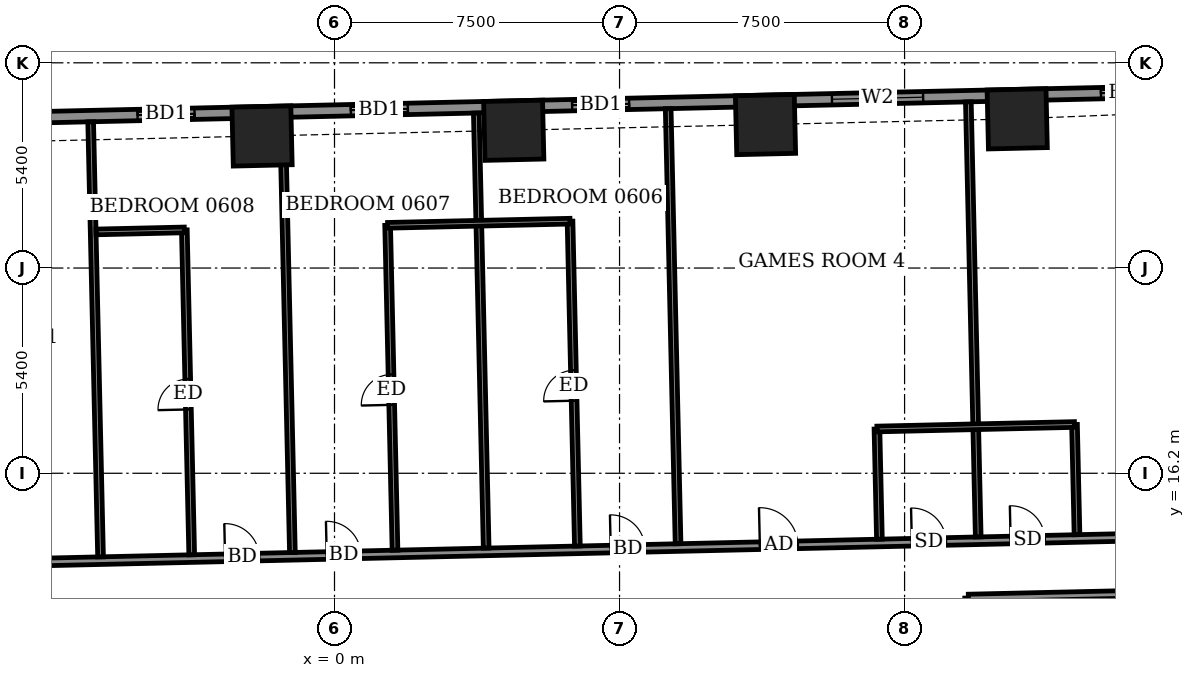
"""IFC4 building model, lengths in metres.
Left out: names, types, materials, properties, quantities, classifications, styles, units other than length and angle.
Written with IfcOpenShell. Run it as: python <this file> out.ifc"""

import sys

from ifc_helpers import new_model, si_unit, direction, frame, frame_2d, origin, origin_2d, place, context, subcontext, project, spatial, rectangle, extrude, element, fill, save


model = new_model("IFC4")
c1 = context("Model", 3, precision=1e-05, world=origin(), true_north=direction((0.0, 1.0)))
c2 = subcontext(c1, "Body", "Model", "MODEL_VIEW")
j1 = project(units=[si_unit("LENGTHUNIT", "METRE"), si_unit("PLANEANGLEUNIT", "RADIAN")], contexts=[c1])
p1 = place(None, origin())
s1 = spatial("IfcSite", under=j1, at=p1, CompositionType="ELEMENT")
p2 = place(p1, origin())
s2 = spatial("IfcBuilding", under=s1, at=p2, CompositionType="ELEMENT")
p3 = place(p2, frame((0.0, 0.0, 29.5)))
s3 = spatial("IfcBuildingStorey", under=s2, at=p3, CompositionType="ELEMENT", Elevation=29.5)
for number, where, z_axis, x_axis in (
    (1, (17.964, 25.526, -0.55), (0.0, 0.0, 1.0), (-1.0, -0.023, 0.0)),
    (2, (11.341, 25.375, -0.55), (0.0, 0.0, 1.0), (-1.0, -0.023, 0.0)),
    (3, (4.717, 25.225, -0.55), (0.0, 0.0, 1.0), (-1.0, -0.023, 0.0)),
    (4, (-1.906, 25.075, -0.55), (0.0, 0.0, 1.0), (-1.0, -0.023, 0.0)),
):
    element("IfcColumn", number, at=place(p3, frame(where, z_axis=z_axis, x_axis=x_axis)), inside=s3, PredefinedType="COLUMN", context=c2, shape_type="SweptSolid", body=[
        extrude(rectangle(XDim=1.55, YDim=1.55, at=origin_2d()), origin(), (0.0, 0.0, 1.0), 4.6),
    ])
p4 = place(p3, frame((24.423, 26.298, 0.0), z_axis=(0.0, 0.0, 1.0), x_axis=(-0.999742433108, -0.022695097355, 0.0)))
e5 = element("IfcWall", 5, at=p4, inside=s3, PredefinedType="SOLIDWALL", context=c2, shape_type="SweptSolid", body=[
    extrude(rectangle(XDim=52.701, YDim=0.3, at=frame_2d((26.35, 0.0))), origin(), (0.0, 0.0, 1.0), 4.05),
])
p5 = place(p4, frame((2.757, 0.0, 0.0)))
e6 = element("IfcOpeningElement", 6, at=p5, cuts=e5, PredefinedType="OPENING", context=c2, shape_type="SweptSolid", body=[
    extrude(rectangle(XDim=1.5, YDim=2.4, at=frame_2d((0.75, 1.2))), frame((0.0, 0.16, 0.0), z_axis=(0.0, -1.0, 0.0), x_axis=(1.0, 0.0, 0.0)), (0.0, 0.0, 1.0), 0.32),
])
p6 = place(p4, frame((8.937, 0.0, 0.9)))
e7 = element("IfcOpeningElement", 7, at=p6, cuts=e5, PredefinedType="OPENING", context=c2, shape_type="SweptSolid", body=[
    extrude(rectangle(XDim=2.4, YDim=1.5, at=frame_2d((1.2, 0.75))), frame((0.0, 0.16, 0.0), z_axis=(0.0, -1.0, 0.0), x_axis=(1.0, 0.0, 0.0)), (0.0, 0.0, 1.0), 0.32),
])
p7 = place(p4, frame((16.675, 0.0, 0.0)))
e8 = element("IfcOpeningElement", 8, at=p7, cuts=e5, PredefinedType="OPENING", context=c2, shape_type="SweptSolid", body=[
    extrude(rectangle(XDim=1.5, YDim=2.4, at=frame_2d((0.75, 1.2))), frame((0.0, 0.16, 0.0), z_axis=(0.0, -1.0, 0.0), x_axis=(1.0, 0.0, 0.0)), (0.0, 0.0, 1.0), 0.32),
])
p8 = place(p4, frame((22.5, 0.0, 0.0)))
e9 = element("IfcOpeningElement", 9, at=p8, cuts=e5, PredefinedType="OPENING", context=c2, shape_type="SweptSolid", body=[
    extrude(rectangle(XDim=1.5, YDim=2.4, at=frame_2d((0.75, 1.2))), frame((0.0, 0.16, 0.0), z_axis=(0.0, -1.0, 0.0), x_axis=(1.0, 0.0, 0.0)), (0.0, 0.0, 1.0), 0.32),
])
p9 = place(p4, frame((28.113, 0.0, 0.0)))
e10 = element("IfcOpeningElement", 10, at=p9, cuts=e5, PredefinedType="OPENING", context=c2, shape_type="SweptSolid", body=[
    extrude(rectangle(XDim=1.5, YDim=2.4, at=frame_2d((0.75, 1.2))), frame((0.0, 0.16, 0.0), z_axis=(0.0, -1.0, 0.0), x_axis=(1.0, 0.0, 0.0)), (0.0, 0.0, 1.0), 0.32),
])
p10 = place(p4, frame((34.1, 0.0, 0.9)))
e11 = element("IfcOpeningElement", 11, at=p10, cuts=e5, PredefinedType="OPENING", context=c2, shape_type="SweptSolid", body=[
    extrude(rectangle(XDim=2.4, YDim=1.5, at=frame_2d((1.2, 0.75))), frame((0.0, 0.16, 0.0), z_axis=(0.0, -1.0, 0.0), x_axis=(1.0, 0.0, 0.0)), (0.0, 0.0, 1.0), 0.32),
])
p11 = place(p4, frame((41.363, 0.0, 0.9)))
e12 = element("IfcOpeningElement", 12, at=p11, cuts=e5, PredefinedType="OPENING", context=c2, shape_type="SweptSolid", body=[
    extrude(rectangle(XDim=2.4, YDim=1.5, at=frame_2d((1.2, 0.75))), frame((0.0, 0.16, 0.0), z_axis=(0.0, -1.0, 0.0), x_axis=(1.0, 0.0, 0.0)), (0.0, 0.0, 1.0), 0.32),
])
p12 = place(p4, frame((47.965, 0.0, 0.9)))
e13 = element("IfcOpeningElement", 13, at=p12, cuts=e5, PredefinedType="OPENING", context=c2, shape_type="SweptSolid", body=[
    extrude(rectangle(XDim=2.4, YDim=1.5, at=frame_2d((1.2, 0.75))), frame((0.0, 0.16, 0.0), z_axis=(0.0, -1.0, 0.0), x_axis=(1.0, 0.0, 0.0)), (0.0, 0.0, 1.0), 0.32),
])
p13 = place(p3, frame((2.746, 27.256, 0.0), z_axis=(0.0, 0.0, 1.0), x_axis=(0.999743073592, 0.022666865795, 0.0)))
e14 = element("IfcWall", 14, at=p13, inside=s3, PredefinedType="USERDEFINED", context=c2, shape_type="SweptSolid", body=[
    extrude(rectangle(XDim=5.999, YDim=0.55, at=frame_2d((3.0, 0.0))), origin(), (0.0, 0.0, 1.0), 0.8),
])
p14 = place(p3, frame((16.803, 7.675, 0.0), z_axis=(0.0, 0.0, 1.0), x_axis=(-0.022667483124, 0.999743059595, 0.0)))
e15 = element("IfcWall", 15, at=p14, inside=s3, PredefinedType="PARTITIONING", context=c2, shape_type="SweptSolid", body=[
    extrude(rectangle(XDim=5.245, YDim=0.2, at=frame_2d((2.623, 0.0))), origin(), (0.0, 0.0, 1.0), 4.05),
])
p15 = place(p14, frame((1.075, 0.0, 0.0)))
e16 = element("IfcOpeningElement", 16, at=p15, cuts=e15, PredefinedType="OPENING", context=c2, shape_type="SweptSolid", body=[
    extrude(rectangle(XDim=0.9, YDim=2.1, at=frame_2d((0.45, 1.05))), frame((0.0, 0.11, 0.0), z_axis=(0.0, -1.0, 0.0), x_axis=(1.0, 0.0, 0.0)), (0.0, 0.0, 1.0), 0.22),
])
p16 = place(p3, frame((16.679, 12.918, 0.0), z_axis=(0.0, 0.0, 1.0), x_axis=(0.999742162372, 0.022707020428, 0.0)))
e17 = element("IfcWall", 17, at=p16, inside=s3, PredefinedType="PARTITIONING", context=c2, shape_type="SweptSolid", body=[
    extrude(rectangle(XDim=10.795, YDim=0.2, at=frame_2d((5.397, 0.0))), origin(), (0.0, 0.0, 1.0), 4.05),
])
p17 = place(p3, frame((-31.347, 13.329, 0.0), z_axis=(0.0, 0.0, 1.0), x_axis=(0.999742613079, 0.022687168058, 0.0)))
e18 = element("IfcWall", 18, at=p17, inside=s3, PredefinedType="PARTITIONING", context=c2, shape_type="SweptSolid", body=[
    extrude(rectangle(XDim=58.799, YDim=0.2, at=frame_2d((29.399, 0.0))), origin(), (0.0, 0.0, 1.0), 4.05),
])
p18 = place(p17, frame((55.05, 0.0, 0.0)))
e19 = element("IfcOpeningElement", 19, at=p18, cuts=e18, PredefinedType="OPENING", context=c2, shape_type="SweptSolid", body=[
    extrude(rectangle(XDim=1.0, YDim=2.1, at=frame_2d((0.5, 1.05))), frame((0.0, 0.11, 0.0), z_axis=(0.0, -1.0, 0.0), x_axis=(1.0, 0.0, 0.0)), (0.0, 0.0, 1.0), 0.22),
])
p19 = place(p17, frame((49.15, 0.0, 0.0)))
e20 = element("IfcOpeningElement", 20, at=p19, cuts=e18, PredefinedType="OPENING", context=c2, shape_type="SweptSolid", body=[
    extrude(rectangle(XDim=0.9, YDim=2.1, at=frame_2d((0.45, 1.05))), frame((0.0, 0.11, 0.0), z_axis=(0.0, -1.0, 0.0), x_axis=(1.0, 0.0, 0.0)), (0.0, 0.0, 1.0), 0.22),
])
p20 = place(p17, frame((42.55, 0.0, 0.0)))
e21 = element("IfcOpeningElement", 21, at=p20, cuts=e18, PredefinedType="OPENING", context=c2, shape_type="SweptSolid", body=[
    extrude(rectangle(XDim=1.0, YDim=2.1, at=frame_2d((0.5, 1.05))), frame((0.0, 0.11, 0.0), z_axis=(0.0, -1.0, 0.0), x_axis=(1.0, 0.0, 0.0)), (0.0, 0.0, 1.0), 0.22),
])
p21 = place(p17, frame((46.55, 0.0, 0.0)))
e22 = element("IfcOpeningElement", 22, at=p21, cuts=e18, PredefinedType="OPENING", context=c2, shape_type="SweptSolid", body=[
    extrude(rectangle(XDim=0.9, YDim=2.1, at=frame_2d((0.45, 1.05))), frame((0.0, 0.11, 0.0), z_axis=(0.0, -1.0, 0.0), x_axis=(1.0, 0.0, 0.0)), (0.0, 0.0, 1.0), 0.22),
])
p22 = place(p17, frame((38.625, 0.0, 0.0)))
e23 = element("IfcOpeningElement", 23, at=p22, cuts=e18, PredefinedType="OPENING", context=c2, shape_type="SweptSolid", body=[
    extrude(rectangle(XDim=0.9, YDim=2.1, at=frame_2d((0.45, 1.05))), frame((0.0, 0.11, 0.0), z_axis=(0.0, -1.0, 0.0), x_axis=(1.0, 0.0, 0.0)), (0.0, 0.0, 1.0), 0.22),
])
p23 = place(p17, frame((31.15, 0.0, 0.0)))
e24 = element("IfcOpeningElement", 24, at=p23, cuts=e18, PredefinedType="OPENING", context=c2, shape_type="SweptSolid", body=[
    extrude(rectangle(XDim=0.9, YDim=2.1, at=frame_2d((0.45, 1.05))), frame((0.0, 0.11, 0.0), z_axis=(0.0, -1.0, 0.0), x_axis=(1.0, 0.0, 0.0)), (0.0, 0.0, 1.0), 0.22),
])
p24 = place(p17, frame((28.475, 0.0, 0.0)))
e25 = element("IfcOpeningElement", 25, at=p24, cuts=e18, PredefinedType="OPENING", context=c2, shape_type="SweptSolid", body=[
    extrude(rectangle(XDim=0.9, YDim=2.1, at=frame_2d((0.45, 1.05))), frame((0.0, 0.11, 0.0), z_axis=(0.0, -1.0, 0.0), x_axis=(1.0, 0.0, 0.0)), (0.0, 0.0, 1.0), 0.22),
])
p25 = place(p17, frame((21.6, 0.0, 0.0)))
e26 = element("IfcOpeningElement", 26, at=p25, cuts=e18, PredefinedType="OPENING", context=c2, shape_type="SweptSolid", body=[
    extrude(rectangle(XDim=1.0, YDim=2.1, at=frame_2d((0.5, 1.05))), frame((0.0, 0.11, 0.0), z_axis=(0.0, -1.0, 0.0), x_axis=(1.0, 0.0, 0.0)), (0.0, 0.0, 1.0), 0.22),
])
p26 = place(p17, frame((15.85, 0.0, 0.0)))
e27 = element("IfcOpeningElement", 27, at=p26, cuts=e18, PredefinedType="OPENING", context=c2, shape_type="SweptSolid", body=[
    extrude(rectangle(XDim=1.0, YDim=2.1, at=frame_2d((0.5, 1.05))), frame((0.0, 0.11, 0.0), z_axis=(0.0, -1.0, 0.0), x_axis=(1.0, 0.0, 0.0)), (0.0, 0.0, 1.0), 0.22),
])
p27 = place(p17, frame((11.95, 0.0, 0.0)))
e28 = element("IfcOpeningElement", 28, at=p27, cuts=e18, PredefinedType="OPENING", context=c2, shape_type="SweptSolid", body=[
    extrude(rectangle(XDim=0.9, YDim=2.1, at=frame_2d((0.45, 1.05))), frame((0.0, 0.11, 0.0), z_axis=(0.0, -1.0, 0.0), x_axis=(1.0, 0.0, 0.0)), (0.0, 0.0, 1.0), 0.22),
])
p28 = place(p17, frame((3.15, 0.0, 0.0)))
e29 = element("IfcOpeningElement", 29, at=p28, cuts=e18, PredefinedType="OPENING", context=c2, shape_type="SweptSolid", body=[
    extrude(rectangle(XDim=1.0, YDim=2.1, at=frame_2d((0.5, 1.05))), frame((0.0, 0.11, 0.0), z_axis=(0.0, -1.0, 0.0), x_axis=(1.0, 0.0, 0.0)), (0.0, 0.0, 1.0), 0.22),
])
p29 = place(p17, frame((9.45, 0.0, 0.0)))
e30 = element("IfcOpeningElement", 30, at=p29, cuts=e18, PredefinedType="OPENING", context=c2, shape_type="SweptSolid", body=[
    extrude(rectangle(XDim=0.9, YDim=2.1, at=frame_2d((0.45, 1.05))), frame((0.0, 0.11, 0.0), z_axis=(0.0, -1.0, 0.0), x_axis=(1.0, 0.0, 0.0)), (0.0, 0.0, 1.0), 0.22),
])
p30 = place(p3, frame((-6.156, 14.001, 0.0), z_axis=(0.0, 0.0, 1.0), x_axis=(-0.022708327922, 0.999742132674, 0.0)))
e31 = element("IfcWall", 31, at=p30, inside=s3, PredefinedType="PARTITIONING", context=c2, shape_type="SweptSolid", body=[
    extrude(rectangle(XDim=11.45, YDim=0.15, at=frame_2d((5.725, 0.0))), origin(), (0.0, 0.0, 1.0), 3.55),
])
p31 = place(p3, frame((-3.757, 14.055, 0.0), z_axis=(0.0, 0.0, 1.0), x_axis=(-0.022671462533, 0.999742969361, 0.0)))
e32 = element("IfcWall", 32, at=p31, inside=s3, PredefinedType="PARTITIONING", context=c2, shape_type="SweptSolid", body=[
    extrude(rectangle(XDim=8.55, YDim=0.15, at=frame_2d((4.275, 0.0))), origin(), (0.0, 0.0, 1.0), 4.05),
])
p32 = place(p31, frame((3.825, 0.0, 0.0)))
e33 = element("IfcOpeningElement", 33, at=p32, cuts=e32, PredefinedType="OPENING", context=c2, shape_type="SweptSolid", body=[
    extrude(rectangle(XDim=0.8, YDim=2.1, at=frame_2d((0.4, 1.05))), frame((0.0, 0.085, 0.0), z_axis=(0.0, -1.0, 0.0), x_axis=(1.0, 0.0, 0.0)), (0.0, 0.0, 1.0), 0.17),
])
p33 = place(p3, frame((-1.108, 14.115, 0.0), z_axis=(0.0, 0.0, 1.0), x_axis=(-0.022623082162, 0.999744065325, 0.0)))
e34 = element("IfcWall", 34, at=p33, inside=s3, PredefinedType="PARTITIONING", context=c2, shape_type="SweptSolid", body=[
    extrude(rectangle(XDim=11.45, YDim=0.15, at=frame_2d((5.725, 0.0))), origin(), (0.0, 0.0, 1.0), 4.05),
])
p34 = place(p3, frame((1.592, 14.176, 0.0), z_axis=(0.0, 0.0, 1.0), x_axis=(-0.022700001308, 0.999742321771, 0.0)))
e35 = element("IfcWall", 35, at=p34, inside=s3, PredefinedType="PARTITIONING", context=c2, shape_type="SweptSolid", body=[
    extrude(rectangle(XDim=8.55, YDim=0.15, at=frame_2d((4.275, 0.0))), origin(), (0.0, 0.0, 1.0), 4.05),
])
p35 = place(p34, frame((3.825, 0.0, 0.0)))
e36 = element("IfcOpeningElement", 36, at=p35, cuts=e35, PredefinedType="OPENING", context=c2, shape_type="SweptSolid", body=[
    extrude(rectangle(XDim=0.8, YDim=2.1, at=frame_2d((0.4, 1.05))), frame((0.0, 0.085, 0.0), z_axis=(0.0, -1.0, 0.0), x_axis=(1.0, 0.0, 0.0)), (0.0, 0.0, 1.0), 0.17),
])
p36 = place(p3, frame((3.991, 14.231, 0.0), z_axis=(0.0, 0.0, 1.0), x_axis=(-0.022708327922, 0.999742132674, 0.0)))
e37 = element("IfcWall", 37, at=p36, inside=s3, PredefinedType="PARTITIONING", context=c2, shape_type="SweptSolid", body=[
    extrude(rectangle(XDim=11.45, YDim=0.15, at=frame_2d((5.725, 0.0))), origin(), (0.0, 0.0, 1.0), 3.55),
])
p37 = place(p3, frame((6.391, 14.285, 0.0), z_axis=(0.0, 0.0, 1.0), x_axis=(-0.022700001308, 0.999742321771, 0.0)))
e38 = element("IfcWall", 38, at=p37, inside=s3, PredefinedType="PARTITIONING", context=c2, shape_type="SweptSolid", body=[
    extrude(rectangle(XDim=8.55, YDim=0.15, at=frame_2d((4.275, 0.0))), origin(), (0.0, 0.0, 1.0), 4.05),
])
p38 = place(p37, frame((3.825, 0.0, 0.0)))
e39 = element("IfcOpeningElement", 39, at=p38, cuts=e38, PredefinedType="OPENING", context=c2, shape_type="SweptSolid", body=[
    extrude(rectangle(XDim=0.8, YDim=2.1, at=frame_2d((0.4, 1.05))), frame((0.0, 0.085, 0.0), z_axis=(0.0, -1.0, 0.0), x_axis=(1.0, 0.0, 0.0)), (0.0, 0.0, 1.0), 0.17),
])
p39 = place(p3, frame((9.04, 14.346, 0.0), z_axis=(0.0, 0.0, 1.0), x_axis=(-0.022708327922, 0.999742132674, 0.0)))
e40 = element("IfcWall", 40, at=p39, inside=s3, PredefinedType="PARTITIONING", context=c2, shape_type="SweptSolid", body=[
    extrude(rectangle(XDim=11.45, YDim=0.15, at=frame_2d((5.725, 0.0))), origin(), (0.0, 0.0, 1.0), 3.55),
])
p40 = place(p3, frame((14.338, 14.466, 0.0), z_axis=(0.0, 0.0, 1.0), x_axis=(-0.022396267458, 0.999749172145, 0.0)))
e41 = element("IfcWall", 41, at=p40, inside=s3, PredefinedType="PARTITIONING", context=c2, shape_type="SweptSolid", body=[
    extrude(rectangle(XDim=2.9, YDim=0.15, at=frame_2d((1.45, 0.0))), origin(), (0.0, 0.0, 1.0), 4.05),
])
p41 = place(p3, frame((16.938, 14.525, 0.0), z_axis=(0.0, 0.0, 1.0), x_axis=(-0.022708327922, 0.999742132674, 0.0)))
e42 = element("IfcWall", 42, at=p41, inside=s3, PredefinedType="PARTITIONING", context=c2, shape_type="SweptSolid", body=[
    extrude(rectangle(XDim=11.45, YDim=0.15, at=frame_2d((5.725, 0.0))), origin(), (0.0, 0.0, 1.0), 3.55),
])
p42 = place(p3, frame((19.537, 14.584, 0.0), z_axis=(0.0, 0.0, 1.0), x_axis=(-0.022817032779, 0.999739657619, 0.0)))
e43 = element("IfcWall", 43, at=p42, inside=s3, PredefinedType="PARTITIONING", context=c2, shape_type="SweptSolid", body=[
    extrude(rectangle(XDim=2.9, YDim=0.15, at=frame_2d((1.45, 0.0))), origin(), (0.0, 0.0, 1.0), 4.05),
])
p43 = place(p3, frame((14.273, 17.365, 0.0), z_axis=(0.0, 0.0, 1.0), x_axis=(0.999742780105, 0.022679806622, 0.0)))
e44 = element("IfcWall", 44, at=p43, inside=s3, PredefinedType="PARTITIONING", context=c2, shape_type="SweptSolid", body=[
    extrude(rectangle(XDim=5.199, YDim=0.15, at=frame_2d((2.6, 0.0))), origin(), (0.0, 0.0, 1.0), 4.05),
])
p44 = place(p3, frame((-6.275, 22.55, 0.0), z_axis=(0.0, 0.0, 1.0), x_axis=(0.999740260747, 0.02279059109, 0.0)))
e45 = element("IfcWall", 45, at=p44, inside=s3, PredefinedType="PARTITIONING", context=c2, shape_type="SweptSolid", body=[
    extrude(rectangle(XDim=2.324, YDim=0.15, at=frame_2d((1.162, 0.0))), origin(), (0.0, 0.0, 1.0), 4.05),
])
p45 = place(p3, frame((1.398, 22.724, 0.0), z_axis=(0.0, 0.0, 1.0), x_axis=(0.999742701292, 0.022683280499, 0.0)))
e46 = element("IfcWall", 46, at=p45, inside=s3, PredefinedType="PARTITIONING", context=c2, shape_type="SweptSolid", body=[
    extrude(rectangle(XDim=4.8, YDim=0.15, at=frame_2d((2.4, 0.0))), origin(), (0.0, 0.0, 1.0), 4.05),
])
p46 = place(p5, origin())
e47 = element("IfcDoor", 47, at=p46, inside=s3, OperationType="SLIDING_TO_LEFT", PredefinedType="DOOR", context=c2, shape_type="SweptSolid", body=[
    extrude(rectangle(XDim=1.5, YDim=2.4, at=frame_2d((0.75, 1.2))), frame((0.0, 0.025, 0.0), z_axis=(0.0, -1.0, 0.0), x_axis=(1.0, 0.0, 0.0)), (0.0, 0.0, 1.0), 0.05),
])
fill(e6, e47)
p47 = place(p6, origin())
e48 = element("IfcWindow", 48, at=p47, inside=s3, PartitioningType="DOUBLE_PANEL_VERTICAL", PredefinedType="WINDOW", context=c2, shape_type="SweptSolid", body=[
    extrude(rectangle(XDim=2.4, YDim=1.5, at=frame_2d((1.2, 0.75))), frame((0.0, 0.03, 0.0), z_axis=(0.0, -1.0, 0.0), x_axis=(1.0, 0.0, 0.0)), (0.0, 0.0, 1.0), 0.06),
])
fill(e7, e48)
p48 = place(p7, origin())
e49 = element("IfcDoor", 49, at=p48, inside=s3, OperationType="SLIDING_TO_LEFT", PredefinedType="DOOR", context=c2, shape_type="SweptSolid", body=[
    extrude(rectangle(XDim=1.5, YDim=2.4, at=frame_2d((0.75, 1.2))), frame((0.0, 0.025, 0.0), z_axis=(0.0, -1.0, 0.0), x_axis=(1.0, 0.0, 0.0)), (0.0, 0.0, 1.0), 0.05),
])
fill(e8, e49)
p49 = place(p8, origin())
e50 = element("IfcDoor", 50, at=p49, inside=s3, OperationType="SLIDING_TO_LEFT", PredefinedType="DOOR", context=c2, shape_type="SweptSolid", body=[
    extrude(rectangle(XDim=1.5, YDim=2.4, at=frame_2d((0.75, 1.2))), frame((0.0, 0.025, 0.0), z_axis=(0.0, -1.0, 0.0), x_axis=(1.0, 0.0, 0.0)), (0.0, 0.0, 1.0), 0.05),
])
fill(e9, e50)
p50 = place(p9, origin())
e51 = element("IfcDoor", 51, at=p50, inside=s3, OperationType="SLIDING_TO_LEFT", PredefinedType="DOOR", context=c2, shape_type="SweptSolid", body=[
    extrude(rectangle(XDim=1.5, YDim=2.4, at=frame_2d((0.75, 1.2))), frame((0.0, 0.025, 0.0), z_axis=(0.0, -1.0, 0.0), x_axis=(1.0, 0.0, 0.0)), (0.0, 0.0, 1.0), 0.05),
])
fill(e10, e51)
p51 = place(p19, origin())
e52 = element("IfcDoor", 52, at=p51, inside=s3, OperationType="SINGLE_SWING_LEFT", PredefinedType="DOOR", context=c2, shape_type="SweptSolid", body=[
    extrude(rectangle(XDim=0.9, YDim=2.1, at=frame_2d((0.45, 1.05))), frame((0.0, 0.025, 0.0), z_axis=(0.0, -1.0, 0.0), x_axis=(1.0, 0.0, 0.0)), (0.0, 0.0, 1.0), 0.05),
])
fill(e20, e52)
p52 = place(p20, origin())
e53 = element("IfcDoor", 53, at=p52, inside=s3, OperationType="SINGLE_SWING_LEFT", PredefinedType="DOOR", context=c2, shape_type="SweptSolid", body=[
    extrude(rectangle(XDim=1.0, YDim=2.1, at=frame_2d((0.5, 1.05))), frame((0.0, 0.025, 0.0), z_axis=(0.0, -1.0, 0.0), x_axis=(1.0, 0.0, 0.0)), (0.0, 0.0, 1.0), 0.05),
])
fill(e21, e53)
p53 = place(p21, origin())
e54 = element("IfcDoor", 54, at=p53, inside=s3, OperationType="SINGLE_SWING_RIGHT", PredefinedType="DOOR", context=c2, shape_type="SweptSolid", body=[
    extrude(rectangle(XDim=0.9, YDim=2.1, at=frame_2d((0.45, 1.05))), frame((0.0, 0.025, 0.0), z_axis=(0.0, -1.0, 0.0), x_axis=(1.0, 0.0, 0.0)), (0.0, 0.0, 1.0), 0.05),
])
fill(e22, e54)
p54 = place(p22, origin())
e55 = element("IfcDoor", 55, at=p54, inside=s3, OperationType="SINGLE_SWING_RIGHT", PredefinedType="DOOR", context=c2, shape_type="SweptSolid", body=[
    extrude(rectangle(XDim=0.9, YDim=2.1, at=frame_2d((0.45, 1.05))), frame((0.0, 0.025, 0.0), z_axis=(0.0, -1.0, 0.0), x_axis=(1.0, 0.0, 0.0)), (0.0, 0.0, 1.0), 0.05),
])
fill(e23, e55)
p55 = place(p38, origin())
e56 = element("IfcDoor", 56, at=p55, inside=s3, OperationType="SINGLE_SWING_RIGHT", PredefinedType="DOOR", context=c2, shape_type="SweptSolid", body=[
    extrude(rectangle(XDim=0.8, YDim=2.1, at=frame_2d((0.4, 1.05))), frame((0.0, 0.025, 0.0), z_axis=(0.0, -1.0, 0.0), x_axis=(1.0, 0.0, 0.0)), (0.0, 0.0, 1.0), 0.05),
])
fill(e39, e56)
p56 = place(p23, origin())
e57 = element("IfcDoor", 57, at=p56, inside=s3, OperationType="SINGLE_SWING_LEFT", PredefinedType="DOOR", context=c2, shape_type="SweptSolid", body=[
    extrude(rectangle(XDim=0.9, YDim=2.1, at=frame_2d((0.45, 1.05))), frame((0.0, 0.025, 0.0), z_axis=(0.0, -1.0, 0.0), x_axis=(1.0, 0.0, 0.0)), (0.0, 0.0, 1.0), 0.05),
])
fill(e24, e57)
p57 = place(p35, origin())
e58 = element("IfcDoor", 58, at=p57, inside=s3, OperationType="SINGLE_SWING_LEFT", PredefinedType="DOOR", context=c2, shape_type="SweptSolid", body=[
    extrude(rectangle(XDim=0.8, YDim=2.1, at=frame_2d((0.4, 1.05))), frame((0.0, 0.025, 0.0), z_axis=(0.0, -1.0, 0.0), x_axis=(1.0, 0.0, 0.0)), (0.0, 0.0, 1.0), 0.05),
])
fill(e36, e58)
p58 = place(p24, origin())
e59 = element("IfcDoor", 59, at=p58, inside=s3, OperationType="SINGLE_SWING_RIGHT", PredefinedType="DOOR", context=c2, shape_type="SweptSolid", body=[
    extrude(rectangle(XDim=0.9, YDim=2.1, at=frame_2d((0.45, 1.05))), frame((0.0, 0.025, 0.0), z_axis=(0.0, -1.0, 0.0), x_axis=(1.0, 0.0, 0.0)), (0.0, 0.0, 1.0), 0.05),
])
fill(e25, e59)
p59 = place(p32, origin())
e60 = element("IfcDoor", 60, at=p59, inside=s3, OperationType="SINGLE_SWING_RIGHT", PredefinedType="DOOR", context=c2, shape_type="SweptSolid", body=[
    extrude(rectangle(XDim=0.8, YDim=2.1, at=frame_2d((0.4, 1.05))), frame((0.0, 0.025, 0.0), z_axis=(0.0, -1.0, 0.0), x_axis=(1.0, 0.0, 0.0)), (0.0, 0.0, 1.0), 0.05),
])
fill(e33, e60)
save(model, sys.argv[1])
